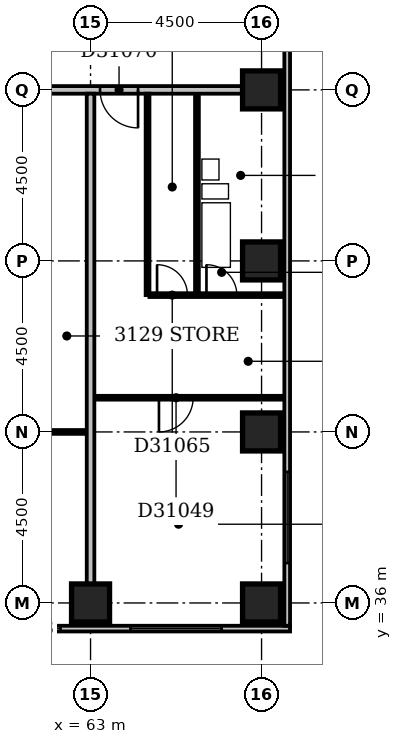
"""IFC4 building model, lengths in metres.
Left out: names, types, materials, properties, quantities, classifications, styles, units other than length and angle.
Written with IfcOpenShell. Run it as: python <this file> out.ifc"""

import sys

from ifc_helpers import new_model, si_unit, direction, frame, frame_2d, origin, origin_2d, place, context, subcontext, project, spatial, rectangle, extrude, element, fill, save


model = new_model("IFC4")
c1 = context("Model", 3, precision=1e-05, world=origin(), true_north=direction((0.0, 1.0)))
c2 = subcontext(c1, "Body", "Model", "MODEL_VIEW")
j1 = project(units=[si_unit("LENGTHUNIT", "METRE"), si_unit("PLANEANGLEUNIT", "RADIAN")], contexts=[c1])
p1 = place(None, origin())
s1 = spatial("IfcSite", under=j1, at=p1, CompositionType="ELEMENT")
p2 = place(p1, origin())
s2 = spatial("IfcBuilding", under=s1, at=p2, CompositionType="ELEMENT")
p3 = place(p2, frame((0.0, 0.0, 126.8)))
s3 = spatial("IfcBuildingStorey", under=s2, at=p3, CompositionType="ELEMENT", Elevation=126.8)
for number, where, z_axis, x_axis in (
    (1, (63.0, 36.0, -0.3), (0.0, 0.0, 1.0), (1.0, 0.0, 0.0)),
    (2, (67.5, 36.0, -0.3), (0.0, 0.0, 1.0), (1.0, 0.0, 0.0)),
    (3, (67.5, 40.5, -0.3), (0.0, 0.0, 1.0), (1.0, 0.0, 0.0)),
    (4, (67.5, 45.0, -0.3), (0.0, 0.0, 1.0), (1.0, 0.0, 0.0)),
    (5, (67.5, 49.5, -0.3), (0.0, 0.0, 1.0), (1.0, 0.0, 0.0)),
):
    element("IfcColumn", number, at=place(p3, frame(where, z_axis=z_axis, x_axis=x_axis)), inside=s3, PredefinedType="COLUMN", context=c2, shape_type="SweptSolid", body=[
        extrude(rectangle(XDim=1.0, YDim=1.0, at=origin_2d()), origin(), (0.0, 0.0, 1.0), 3.6),
    ])
p4 = place(p3, frame((23.1, 35.325, 0.0), z_axis=(0.0, 0.0, 1.0), x_axis=(1.0, 0.0, 0.0)))
e6 = element("IfcWall", 6, at=p4, inside=s3, PredefinedType="STANDARD", context=c2, shape_type="SweptSolid", body=[
    extrude(rectangle(XDim=45.15, YDim=0.15, at=frame_2d((22.575, 0.0))), origin(), (0.0, 0.0, 1.0), 2.7),
])
p5 = place(p4, frame((0.45, 0.0, 0.6)))
e7 = element("IfcOpeningElement", 7, at=p5, cuts=e6, PredefinedType="OPENING", context=c2, shape_type="SweptSolid", body=[
    extrude(rectangle(XDim=2.4, YDim=1.8, at=frame_2d((1.2, 0.9))), frame((0.0, 0.087, 0.0), z_axis=(0.0, -1.0, 0.0), x_axis=(1.0, 0.0, 0.0)), (0.0, 0.0, 1.0), 0.174),
])
p6 = place(p4, frame((4.743, 0.0, 0.6)))
e8 = element("IfcOpeningElement", 8, at=p6, cuts=e6, PredefinedType="OPENING", context=c2, shape_type="SweptSolid", body=[
    extrude(rectangle(XDim=1.8, YDim=1.8, at=frame_2d((0.9, 0.9))), frame((0.0, 0.087, 0.0), z_axis=(0.0, -1.0, 0.0), x_axis=(1.0, 0.0, 0.0)), (0.0, 0.0, 1.0), 0.174),
])
p7 = place(p4, frame((9.45, 0.0, 0.6)))
e9 = element("IfcOpeningElement", 9, at=p7, cuts=e6, PredefinedType="OPENING", context=c2, shape_type="SweptSolid", body=[
    extrude(rectangle(XDim=2.4, YDim=1.8, at=frame_2d((1.2, 0.9))), frame((0.0, 0.087, 0.0), z_axis=(0.0, -1.0, 0.0), x_axis=(1.0, 0.0, 0.0)), (0.0, 0.0, 1.0), 0.174),
])
p8 = place(p4, frame((13.95, 0.0, 0.6)))
e10 = element("IfcOpeningElement", 10, at=p8, cuts=e6, PredefinedType="OPENING", context=c2, shape_type="SweptSolid", body=[
    extrude(rectangle(XDim=2.4, YDim=1.8, at=frame_2d((1.2, 0.9))), frame((0.0, 0.087, 0.0), z_axis=(0.0, -1.0, 0.0), x_axis=(1.0, 0.0, 0.0)), (0.0, 0.0, 1.0), 0.174),
])
p9 = place(p4, frame((19.646, 0.0, 0.6)))
e11 = element("IfcOpeningElement", 11, at=p9, cuts=e6, PredefinedType="OPENING", context=c2, shape_type="SweptSolid", body=[
    extrude(rectangle(XDim=1.5, YDim=1.8, at=frame_2d((0.75, 0.9))), frame((0.0, 0.087, 0.0), z_axis=(0.0, -1.0, 0.0), x_axis=(1.0, 0.0, 0.0)), (0.0, 0.0, 1.0), 0.174),
])
p10 = place(p4, frame((22.95, 0.0, 0.6)))
e12 = element("IfcOpeningElement", 12, at=p10, cuts=e6, PredefinedType="OPENING", context=c2, shape_type="SweptSolid", body=[
    extrude(rectangle(XDim=2.4, YDim=1.8, at=frame_2d((1.2, 0.9))), frame((0.0, 0.087, 0.0), z_axis=(0.0, -1.0, 0.0), x_axis=(1.0, 0.0, 0.0)), (0.0, 0.0, 1.0), 0.174),
])
p11 = place(p4, frame((27.45, 0.0, 0.6)))
e13 = element("IfcOpeningElement", 13, at=p11, cuts=e6, PredefinedType="OPENING", context=c2, shape_type="SweptSolid", body=[
    extrude(rectangle(XDim=2.4, YDim=1.8, at=frame_2d((1.2, 0.9))), frame((0.0, 0.087, 0.0), z_axis=(0.0, -1.0, 0.0), x_axis=(1.0, 0.0, 0.0)), (0.0, 0.0, 1.0), 0.174),
])
p12 = place(p4, frame((31.95, 0.0, 0.6)))
e14 = element("IfcOpeningElement", 14, at=p12, cuts=e6, PredefinedType="OPENING", context=c2, shape_type="SweptSolid", body=[
    extrude(rectangle(XDim=2.4, YDim=1.8, at=frame_2d((1.2, 0.9))), frame((0.0, 0.087, 0.0), z_axis=(0.0, -1.0, 0.0), x_axis=(1.0, 0.0, 0.0)), (0.0, 0.0, 1.0), 0.174),
])
p13 = place(p4, frame((37.911, 0.0, 0.6)))
e15 = element("IfcOpeningElement", 15, at=p13, cuts=e6, PredefinedType="OPENING", context=c2, shape_type="SweptSolid", body=[
    extrude(rectangle(XDim=1.2, YDim=1.8, at=frame_2d((0.6, 0.9))), frame((0.0, 0.087, 0.0), z_axis=(0.0, -1.0, 0.0), x_axis=(1.0, 0.0, 0.0)), (0.0, 0.0, 1.0), 0.174),
])
p14 = place(p4, frame((40.95, 0.0, 0.6)))
e16 = element("IfcOpeningElement", 16, at=p14, cuts=e6, PredefinedType="OPENING", context=c2, shape_type="SweptSolid", body=[
    extrude(rectangle(XDim=2.4, YDim=1.8, at=frame_2d((1.2, 0.9))), frame((0.0, 0.087, 0.0), z_axis=(0.0, -1.0, 0.0), x_axis=(1.0, 0.0, 0.0)), (0.0, 0.0, 1.0), 0.174),
])
p15 = place(p3, frame((68.175, 35.4, 0.0), z_axis=(0.0, 0.0, 1.0), x_axis=(0.0, 1.0, 0.0)))
e17 = element("IfcWall", 17, at=p15, inside=s3, PredefinedType="STANDARD", context=c2, shape_type="SweptSolid", body=[
    extrude(rectangle(XDim=23.85, YDim=0.15, at=frame_2d((11.925, 0.0))), origin(), (0.0, 0.0, 1.0), 2.7),
])
p16 = place(p15, frame((1.65, 0.0, 0.6)))
e18 = element("IfcOpeningElement", 18, at=p16, cuts=e17, PredefinedType="OPENING", context=c2, shape_type="SweptSolid", body=[
    extrude(rectangle(XDim=2.4, YDim=1.8, at=frame_2d((1.2, 0.9))), frame((0.0, 0.087, 0.0), z_axis=(0.0, -1.0, 0.0), x_axis=(1.0, 0.0, 0.0)), (0.0, 0.0, 1.0), 0.174),
])
p17 = place(p15, frame((19.65, 0.0, 0.6)))
e19 = element("IfcOpeningElement", 19, at=p17, cuts=e17, PredefinedType="OPENING", context=c2, shape_type="SweptSolid", body=[
    extrude(rectangle(XDim=2.4, YDim=1.8, at=frame_2d((1.2, 0.9))), frame((0.0, 0.087, 0.0), z_axis=(0.0, -1.0, 0.0), x_axis=(1.0, 0.0, 0.0)), (0.0, 0.0, 1.0), 0.174),
])
p18 = place(p3, frame((63.0, 36.5, 0.0), z_axis=(0.0, 0.0, 1.0), x_axis=(0.0, 1.0, 0.0)))
e20 = element("IfcWall", 20, at=p18, inside=s3, PredefinedType="PARTITIONING", context=c2, shape_type="SweptSolid", body=[
    extrude(rectangle(XDim=12.9, YDim=0.2, at=frame_2d((6.45, 0.0))), origin(), (0.0, 0.0, 1.0), 2.4),
])
p19 = place(p3, frame((58.6, 40.5, 0.0), z_axis=(0.0, 0.0, 1.0), x_axis=(1.0, 0.0, 0.0)))
e21 = element("IfcWall", 21, at=p19, inside=s3, PredefinedType="PARTITIONING", context=c2, shape_type="SweptSolid", body=[
    extrude(rectangle(XDim=4.3, YDim=0.1, at=frame_2d((2.15, 0.0))), origin(), (0.0, 0.0, 1.0), 3.3),
])
p20 = place(p19, frame((1.7, 0.0, 0.0)))
e22 = element("IfcOpeningElement", 22, at=p20, cuts=e21, PredefinedType="OPENING", context=c2, shape_type="SweptSolid", body=[
    extrude(rectangle(XDim=0.9, YDim=2.1, at=frame_2d((0.45, 1.05))), frame((0.0, 0.062, 0.0), z_axis=(0.0, -1.0, 0.0), x_axis=(1.0, 0.0, 0.0)), (0.0, 0.0, 1.0), 0.124),
])
p21 = place(p3, frame((63.1, 41.4, 0.0), z_axis=(0.0, 0.0, 1.0), x_axis=(1.0, 0.0, 0.0)))
e23 = element("IfcWall", 23, at=p21, inside=s3, PredefinedType="PARTITIONING", context=c2, shape_type="SweptSolid", body=[
    extrude(rectangle(XDim=5.0, YDim=0.1, at=frame_2d((2.5, 0.0))), origin(), (0.0, 0.0, 1.0), 3.3),
])
p22 = place(p21, frame((1.7, 0.0, 0.0)))
e24 = element("IfcOpeningElement", 24, at=p22, cuts=e23, PredefinedType="OPENING", context=c2, shape_type="SweptSolid", body=[
    extrude(rectangle(XDim=0.9, YDim=2.1, at=frame_2d((0.45, 1.05))), frame((0.0, 0.062, 0.0), z_axis=(0.0, -1.0, 0.0), x_axis=(1.0, 0.0, 0.0)), (0.0, 0.0, 1.0), 0.124),
])
p23 = place(p3, frame((64.5, 44.1, 0.0), z_axis=(0.0, 0.0, 1.0), x_axis=(0.0, 1.0, 0.0)))
e25 = element("IfcWall", 25, at=p23, inside=s3, PredefinedType="PARTITIONING", context=c2, shape_type="SweptSolid", body=[
    extrude(rectangle(XDim=5.3, YDim=0.1, at=frame_2d((2.65, 0.0))), origin(), (0.0, 0.0, 1.0), 3.3),
])
p24 = place(p3, frame((64.55, 44.1, 0.0), z_axis=(0.0, 0.0, 1.0), x_axis=(1.0, 0.0, 0.0)))
e26 = element("IfcWall", 26, at=p24, inside=s3, PredefinedType="PARTITIONING", context=c2, shape_type="SweptSolid", body=[
    extrude(rectangle(XDim=3.55, YDim=0.1, at=frame_2d((1.775, 0.0))), origin(), (0.0, 0.0, 1.0), 3.3),
])
p25 = place(p24, frame((1.5, 0.0, 0.0)))
e27 = element("IfcOpeningElement", 27, at=p25, cuts=e26, PredefinedType="OPENING", context=c2, shape_type="SweptSolid", body=[
    extrude(rectangle(XDim=0.8, YDim=2.1, at=frame_2d((0.4, 1.05))), frame((0.0, 0.062, 0.0), z_axis=(0.0, -1.0, 0.0), x_axis=(1.0, 0.0, 0.0)), (0.0, 0.0, 1.0), 0.124),
])
p26 = place(p24, frame((0.2, 0.0, 0.0)))
e28 = element("IfcOpeningElement", 28, at=p26, cuts=e26, PredefinedType="OPENING", context=c2, shape_type="SweptSolid", body=[
    extrude(rectangle(XDim=0.8, YDim=2.1, at=frame_2d((0.4, 1.05))), frame((0.0, 0.062, 0.0), z_axis=(0.0, -1.0, 0.0), x_axis=(1.0, 0.0, 0.0)), (0.0, 0.0, 1.0), 0.124),
])
p27 = place(p3, frame((65.8, 44.15, 0.0), z_axis=(0.0, 0.0, 1.0), x_axis=(0.0, 1.0, 0.0)))
e29 = element("IfcWall", 29, at=p27, inside=s3, PredefinedType="PLUMBINGWALL", context=c2, shape_type="SweptSolid", body=[
    extrude(rectangle(XDim=5.25, YDim=0.1, at=frame_2d((2.625, 0.0))), origin(), (0.0, 0.0, 1.0), 3.3),
])
p28 = place(p3, frame((61.85, 49.5, 0.0), z_axis=(0.0, 0.0, 1.0), x_axis=(1.0, 0.0, 0.0)))
e30 = element("IfcWall", 30, at=p28, inside=s3, PredefinedType="PARTITIONING", context=c2, shape_type="SweptSolid", body=[
    extrude(rectangle(XDim=5.15, YDim=0.2, at=frame_2d((2.575, 0.0))), origin(), (0.0, 0.0, 1.0), 3.3),
])
p29 = place(p28, frame((1.4, 0.0, 0.0)))
e31 = element("IfcOpeningElement", 31, at=p29, cuts=e30, PredefinedType="OPENING", context=c2, shape_type="SweptSolid", body=[
    extrude(rectangle(XDim=1.0, YDim=2.1, at=frame_2d((0.5, 1.05))), frame((0.0, 0.112, 0.0), z_axis=(0.0, -1.0, 0.0), x_axis=(1.0, 0.0, 0.0)), (0.0, 0.0, 1.0), 0.224),
])
p30 = place(p13, origin())
e32 = element("IfcWindow", 32, at=p30, inside=s3, PartitioningType="SINGLE_PANEL", PredefinedType="WINDOW", context=c2, shape_type="SweptSolid", body=[
    extrude(rectangle(XDim=1.2, YDim=1.8, at=frame_2d((0.6, 0.9))), frame((0.0, 0.03, 0.0), z_axis=(0.0, -1.0, 0.0), x_axis=(1.0, 0.0, 0.0)), (0.0, 0.0, 1.0), 0.06),
])
fill(e15, e32)
p31 = place(p14, origin())
e33 = element("IfcWindow", 33, at=p31, inside=s3, PartitioningType="SINGLE_PANEL", PredefinedType="WINDOW", context=c2, shape_type="SweptSolid", body=[
    extrude(rectangle(XDim=2.4, YDim=1.8, at=frame_2d((1.2, 0.9))), frame((0.0, 0.03, 0.0), z_axis=(0.0, -1.0, 0.0), x_axis=(1.0, 0.0, 0.0)), (0.0, 0.0, 1.0), 0.06),
])
fill(e16, e33)
p32 = place(p16, origin())
e34 = element("IfcWindow", 34, at=p32, inside=s3, PartitioningType="SINGLE_PANEL", PredefinedType="WINDOW", context=c2, shape_type="SweptSolid", body=[
    extrude(rectangle(XDim=2.4, YDim=1.8, at=frame_2d((1.2, 0.9))), frame((0.0, 0.03, 0.0), z_axis=(0.0, -1.0, 0.0), x_axis=(1.0, 0.0, 0.0)), (0.0, 0.0, 1.0), 0.06),
])
fill(e18, e34)
p33 = place(p22, frame((0.9, 0.0, 0.0), z_axis=(0.0, 0.0, 1.0), x_axis=(-1.0, 0.0, 0.0)))
e35 = element("IfcDoor", 35, at=p33, inside=s3, OperationType="SINGLE_SWING_RIGHT", PredefinedType="DOOR", context=c2, shape_type="SweptSolid", body=[
    extrude(rectangle(XDim=0.9, YDim=2.1, at=frame_2d((0.45, 1.05))), frame((0.0, 0.025, 0.0), z_axis=(0.0, -1.0, 0.0), x_axis=(1.0, 0.0, 0.0)), (0.0, 0.0, 1.0), 0.05),
])
fill(e24, e35)
p34 = place(p25, origin())
e36 = element("IfcDoor", 36, at=p34, inside=s3, OperationType="SINGLE_SWING_LEFT", PredefinedType="DOOR", context=c2, shape_type="SweptSolid", body=[
    extrude(rectangle(XDim=0.8, YDim=2.1, at=frame_2d((0.4, 1.05))), frame((0.0, 0.025, 0.0), z_axis=(0.0, -1.0, 0.0), x_axis=(1.0, 0.0, 0.0)), (0.0, 0.0, 1.0), 0.05),
])
fill(e27, e36)
p35 = place(p26, origin())
e37 = element("IfcDoor", 37, at=p35, inside=s3, OperationType="SINGLE_SWING_LEFT", PredefinedType="DOOR", context=c2, shape_type="SweptSolid", body=[
    extrude(rectangle(XDim=0.8, YDim=2.1, at=frame_2d((0.4, 1.05))), frame((0.0, 0.025, 0.0), z_axis=(0.0, -1.0, 0.0), x_axis=(1.0, 0.0, 0.0)), (0.0, 0.0, 1.0), 0.05),
])
fill(e28, e37)
p36 = place(p29, origin())
e38 = element("IfcDoor", 38, at=p36, inside=s3, OperationType="SINGLE_SWING_RIGHT", PredefinedType="DOOR", context=c2, shape_type="SweptSolid", body=[
    extrude(rectangle(XDim=1.0, YDim=2.1, at=frame_2d((0.5, 1.05))), frame((0.0, 0.025, 0.0), z_axis=(0.0, -1.0, 0.0), x_axis=(1.0, 0.0, 0.0)), (0.0, 0.0, 1.0), 0.05),
])
fill(e31, e38)
save(model, sys.argv[1])
